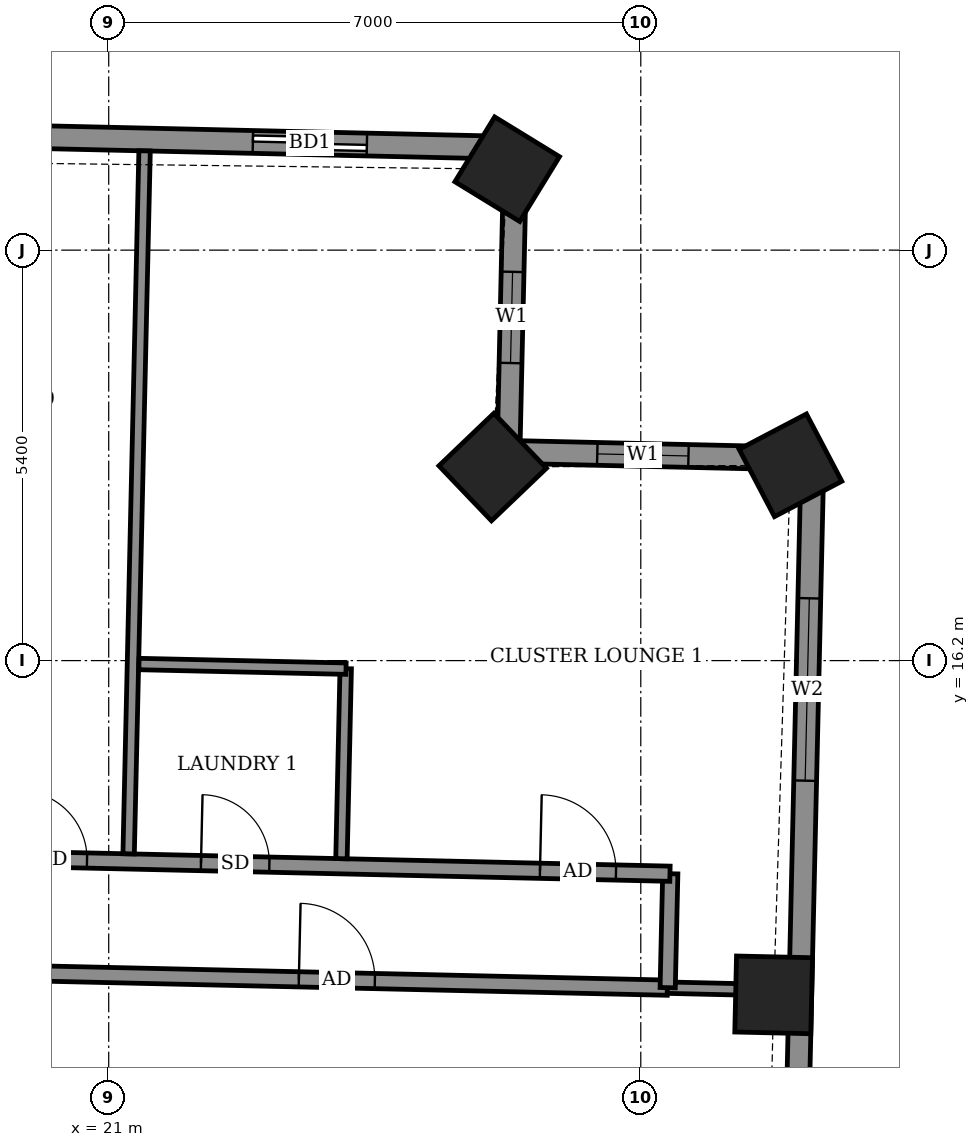
"""IFC4 building model, lengths in metres.
Left out: names, types, materials, properties, quantities, classifications, styles, units other than length and angle.
Written with IfcOpenShell. Run it as: python <this file> out.ifc"""

import sys

from ifc_helpers import new_model, si_unit, direction, frame, frame_2d, origin, origin_2d, place, context, subcontext, project, spatial, rectangle, extrude, element, fill, save


model = new_model("IFC4")
c1 = context("Model", 3, precision=1e-05, world=origin(), true_north=direction((0.0, 1.0)))
c2 = subcontext(c1, "Body", "Model", "MODEL_VIEW")
j1 = project(units=[si_unit("LENGTHUNIT", "METRE"), si_unit("PLANEANGLEUNIT", "RADIAN")], contexts=[c1])
p1 = place(None, origin())
s1 = spatial("IfcSite", under=j1, at=p1, CompositionType="ELEMENT")
p2 = place(p1, origin())
s2 = spatial("IfcBuilding", under=s1, at=p2, CompositionType="ELEMENT")
p3 = place(p2, frame((0.0, 0.0, 268.1)))
s3 = spatial("IfcBuildingStorey", under=s2, at=p3, CompositionType="ELEMENT", Elevation=268.1)
for number, where, z_axis, x_axis in (
    (1, (29.748, 11.802, -0.55), (0.0, 0.0, 1.0), (0.023, 1.0, 0.0)),
    (2, (29.969, 18.77, -0.55), (0.0, 0.0, 1.0), (-0.465, 0.885, 0.0)),
    (3, (26.052, 18.747, -0.55), (0.0, 0.0, 1.0), (-0.691, 0.723, 0.0)),
    (4, (26.243, 22.665, -0.55), (0.0, 0.0, 1.0), (-0.852, 0.523, 0.0)),
):
    element("IfcColumn", number, at=place(p3, frame(where, z_axis=z_axis, x_axis=x_axis)), inside=s3, PredefinedType="COLUMN", context=c2, shape_type="SweptSolid", body=[
        extrude(rectangle(XDim=1.0, YDim=1.0, at=origin_2d()), origin(), (0.0, 0.0, 1.0), 3.6),
    ])
p4 = place(p3, frame((29.923, 4.085, 0.0), z_axis=(0.0, 0.0, 1.0), x_axis=(0.022738672774, 0.999741442954, 0.0)))
e5 = element("IfcWall", 5, at=p4, inside=s3, PredefinedType="SOLIDWALL", context=c2, shape_type="SweptSolid", body=[
    extrude(rectangle(XDim=14.774, YDim=0.3, at=frame_2d((7.387, 0.0))), origin(), (0.0, 0.0, 1.0), 2.55),
])
p5 = place(p4, frame((4.853, 0.0, 0.0)))
e6 = element("IfcOpeningElement", 6, at=p5, cuts=e5, PredefinedType="OPENING", context=c2, shape_type="SweptSolid", body=[
    extrude(rectangle(XDim=1.5, YDim=2.4, at=frame_2d((0.75, 1.2))), frame((0.0, 0.16, 0.0), z_axis=(0.0, -1.0, 0.0), x_axis=(1.0, 0.0, 0.0)), (0.0, 0.0, 1.0), 0.32),
])
p6 = place(p4, frame((10.538, 0.0, 0.9)))
e7 = element("IfcOpeningElement", 7, at=p6, cuts=e5, PredefinedType="OPENING", context=c2, shape_type="SweptSolid", body=[
    extrude(rectangle(XDim=2.4, YDim=1.5, at=frame_2d((1.2, 0.75))), frame((0.0, 0.16, 0.0), z_axis=(0.0, -1.0, 0.0), x_axis=(1.0, 0.0, 0.0)), (0.0, 0.0, 1.0), 0.32),
])
p7 = place(p3, frame((30.259, 18.855, 0.0), z_axis=(0.0, 0.0, 1.0), x_axis=(-0.999740826251, 0.022765770952, 0.0)))
e8 = element("IfcWall", 8, at=p7, inside=s3, PredefinedType="SOLIDWALL", context=c2, shape_type="SweptSolid", body=[
    extrude(rectangle(XDim=4.0, YDim=0.3, at=frame_2d((2.0, 0.0))), origin(), (0.0, 0.0, 1.0), 2.55),
])
p8 = place(p7, frame((1.632, 0.0, 0.9)))
e9 = element("IfcOpeningElement", 9, at=p8, cuts=e8, PredefinedType="OPENING", context=c2, shape_type="SweptSolid", body=[
    extrude(rectangle(XDim=1.2, YDim=1.5, at=frame_2d((0.6, 0.75))), frame((0.0, 0.16, 0.0), z_axis=(0.0, -1.0, 0.0), x_axis=(1.0, 0.0, 0.0)), (0.0, 0.0, 1.0), 0.32),
])
p9 = place(p3, frame((26.26, 18.946, 0.0), z_axis=(0.0, 0.0, 1.0), x_axis=(0.022521758502, 0.999746353029, 0.0)))
e10 = element("IfcWall", 10, at=p9, inside=s3, PredefinedType="SOLIDWALL", context=c2, shape_type="SweptSolid", body=[
    extrude(rectangle(XDim=4.0, YDim=0.3, at=frame_2d((2.0, 0.0))), origin(), (0.0, 0.0, 1.0), 2.55),
])
p10 = place(p9, frame((1.169, 0.0, 0.9)))
e11 = element("IfcOpeningElement", 11, at=p10, cuts=e10, PredefinedType="OPENING", context=c2, shape_type="SweptSolid", body=[
    extrude(rectangle(XDim=1.2, YDim=1.5, at=frame_2d((0.6, 0.75))), frame((0.0, 0.16, 0.0), z_axis=(0.0, -1.0, 0.0), x_axis=(1.0, 0.0, 0.0)), (0.0, 0.0, 1.0), 0.32),
])
p11 = place(p3, frame((26.35, 22.945, 0.0), z_axis=(0.0, 0.0, 1.0), x_axis=(-0.999742523712, 0.022691105788, 0.0)))
e12 = element("IfcWall", 12, at=p11, inside=s3, PredefinedType="SOLIDWALL", context=c2, shape_type="SweptSolid", body=[
    extrude(rectangle(XDim=47.771, YDim=0.3, at=frame_2d((23.886, 0.0))), origin(), (0.0, 0.0, 1.0), 2.55),
])
p12 = place(p11, frame((1.954, 0.0, 0.0)))
e13 = element("IfcOpeningElement", 13, at=p12, cuts=e12, PredefinedType="OPENING", context=c2, shape_type="SweptSolid", body=[
    extrude(rectangle(XDim=1.5, YDim=2.4, at=frame_2d((0.75, 1.2))), frame((0.0, 0.16, 0.0), z_axis=(0.0, -1.0, 0.0), x_axis=(1.0, 0.0, 0.0)), (0.0, 0.0, 1.0), 0.32),
])
p13 = place(p11, frame((7.37, 0.0, 0.0)))
e14 = element("IfcOpeningElement", 14, at=p13, cuts=e12, PredefinedType="OPENING", context=c2, shape_type="SweptSolid", body=[
    extrude(rectangle(XDim=1.5, YDim=2.4, at=frame_2d((0.75, 1.2))), frame((0.0, 0.16, 0.0), z_axis=(0.0, -1.0, 0.0), x_axis=(1.0, 0.0, 0.0)), (0.0, 0.0, 1.0), 0.32),
])
p14 = place(p11, frame((10.554, 0.0, 0.0)))
e15 = element("IfcOpeningElement", 15, at=p14, cuts=e12, PredefinedType="OPENING", context=c2, shape_type="SweptSolid", body=[
    extrude(rectangle(XDim=1.5, YDim=2.4, at=frame_2d((0.75, 1.2))), frame((0.0, 0.16, 0.0), z_axis=(0.0, -1.0, 0.0), x_axis=(1.0, 0.0, 0.0)), (0.0, 0.0, 1.0), 0.32),
])
p15 = place(p11, frame((15.104, 0.0, 0.0)))
e16 = element("IfcOpeningElement", 16, at=p15, cuts=e12, PredefinedType="OPENING", context=c2, shape_type="SweptSolid", body=[
    extrude(rectangle(XDim=1.5, YDim=2.4, at=frame_2d((0.75, 1.2))), frame((0.0, 0.16, 0.0), z_axis=(0.0, -1.0, 0.0), x_axis=(1.0, 0.0, 0.0)), (0.0, 0.0, 1.0), 0.32),
])
p16 = place(p11, frame((18.287, 0.0, 0.0)))
e17 = element("IfcOpeningElement", 17, at=p16, cuts=e12, PredefinedType="OPENING", context=c2, shape_type="SweptSolid", body=[
    extrude(rectangle(XDim=1.5, YDim=2.4, at=frame_2d((0.75, 1.2))), frame((0.0, 0.16, 0.0), z_axis=(0.0, -1.0, 0.0), x_axis=(1.0, 0.0, 0.0)), (0.0, 0.0, 1.0), 0.32),
])
p17 = place(p11, frame((23.622, 0.0, 0.0)))
e18 = element("IfcOpeningElement", 18, at=p17, cuts=e12, PredefinedType="OPENING", context=c2, shape_type="SweptSolid", body=[
    extrude(rectangle(XDim=1.5, YDim=2.4, at=frame_2d((0.75, 1.2))), frame((0.0, 0.16, 0.0), z_axis=(0.0, -1.0, 0.0), x_axis=(1.0, 0.0, 0.0)), (0.0, 0.0, 1.0), 0.32),
])
p18 = place(p11, frame((28.521, 0.0, 0.0)))
e19 = element("IfcOpeningElement", 19, at=p18, cuts=e12, PredefinedType="OPENING", context=c2, shape_type="SweptSolid", body=[
    extrude(rectangle(XDim=1.5, YDim=2.4, at=frame_2d((0.75, 1.2))), frame((0.0, 0.16, 0.0), z_axis=(0.0, -1.0, 0.0), x_axis=(1.0, 0.0, 0.0)), (0.0, 0.0, 1.0), 0.32),
])
p19 = place(p11, frame((31.705, 0.0, 0.0)))
e20 = element("IfcOpeningElement", 20, at=p19, cuts=e12, PredefinedType="OPENING", context=c2, shape_type="SweptSolid", body=[
    extrude(rectangle(XDim=1.5, YDim=2.4, at=frame_2d((0.75, 1.2))), frame((0.0, 0.16, 0.0), z_axis=(0.0, -1.0, 0.0), x_axis=(1.0, 0.0, 0.0)), (0.0, 0.0, 1.0), 0.32),
])
p20 = place(p11, frame((36.722, 0.0, 0.0)))
e21 = element("IfcOpeningElement", 21, at=p20, cuts=e12, PredefinedType="OPENING", context=c2, shape_type="SweptSolid", body=[
    extrude(rectangle(XDim=1.5, YDim=2.4, at=frame_2d((0.75, 1.2))), frame((0.0, 0.16, 0.0), z_axis=(0.0, -1.0, 0.0), x_axis=(1.0, 0.0, 0.0)), (0.0, 0.0, 1.0), 0.32),
])
p21 = place(p11, frame((41.963, 0.0, 0.0)))
e22 = element("IfcOpeningElement", 22, at=p21, cuts=e12, PredefinedType="OPENING", context=c2, shape_type="SweptSolid", body=[
    extrude(rectangle(XDim=1.5, YDim=2.4, at=frame_2d((0.75, 1.2))), frame((0.0, 0.16, 0.0), z_axis=(0.0, -1.0, 0.0), x_axis=(1.0, 0.0, 0.0)), (0.0, 0.0, 1.0), 0.32),
])
p22 = place(p11, frame((44.436, 0.0, 0.9)))
e23 = element("IfcOpeningElement", 23, at=p22, cuts=e12, PredefinedType="OPENING", context=c2, shape_type="SweptSolid", body=[
    extrude(rectangle(XDim=2.4, YDim=1.5, at=frame_2d((1.2, 0.75))), frame((0.0, 0.16, 0.0), z_axis=(0.0, -1.0, 0.0), x_axis=(1.0, 0.0, 0.0)), (0.0, 0.0, 1.0), 0.32),
])
p23 = place(p3, frame((17.753, 12.137, 0.0), z_axis=(0.0, 0.0, 1.0), x_axis=(0.999743663474, -0.022640833553, 0.0)))
e24 = element("IfcWall", 24, at=p23, inside=s3, PredefinedType="PARTITIONING", context=c2, shape_type="SweptSolid", body=[
    extrude(rectangle(XDim=10.6, YDim=0.2, at=frame_2d((5.3, 0.0))), origin(), (0.0, 0.0, 1.0), 3.05),
])
p24 = place(p23, frame((5.75, 0.0, 0.0)))
e25 = element("IfcOpeningElement", 25, at=p24, cuts=e24, PredefinedType="OPENING", context=c2, shape_type="SweptSolid", body=[
    extrude(rectangle(XDim=1.0, YDim=2.1, at=frame_2d((0.5, 1.05))), frame((0.0, 0.11, 0.0), z_axis=(0.0, -1.0, 0.0), x_axis=(1.0, 0.0, 0.0)), (0.0, 0.0, 1.0), 0.22),
])
p25 = place(p3, frame((28.35, 11.897, 0.0), z_axis=(0.0, 0.0, 1.0), x_axis=(0.999734618493, -0.023036765969, 0.0)))
e26 = element("IfcWall", 26, at=p25, inside=s3, PredefinedType="PARTITIONING", context=c2, shape_type="SweptSolid", body=[
    extrude(rectangle(XDim=1.6, YDim=0.15, at=frame_2d((0.8, 0.0))), origin(), (0.0, 0.0, 1.0), 3.05),
])
p26 = place(p3, frame((28.354, 11.897, 0.0), z_axis=(0.0, 0.0, 1.0), x_axis=(0.022632637625, 0.99974384905, 0.0)))
e27 = element("IfcWall", 27, at=p26, inside=s3, PredefinedType="PARTITIONING", context=c2, shape_type="SweptSolid", body=[
    extrude(rectangle(XDim=1.5, YDim=0.2, at=frame_2d((0.75, 0.0))), origin(), (0.0, 0.0, 1.0), 3.05),
])
p27 = place(p3, frame((-24.474, 14.596, 0.0), z_axis=(0.0, 0.0, 1.0), x_axis=(0.999742424031, -0.022695497208, 0.0)))
e28 = element("IfcWall", 28, at=p27, inside=s3, PredefinedType="PARTITIONING", context=c2, shape_type="SweptSolid", body=[
    extrude(rectangle(XDim=52.872, YDim=0.2, at=frame_2d((26.436, 0.0))), origin(), (0.0, 0.0, 1.0), 3.05),
])
p28 = place(p27, frame((51.161, 0.0, 0.0)))
e29 = element("IfcOpeningElement", 29, at=p28, cuts=e28, PredefinedType="OPENING", context=c2, shape_type="SweptSolid", body=[
    extrude(rectangle(XDim=1.0, YDim=2.1, at=frame_2d((0.5, 1.05))), frame((0.0, 0.11, 0.0), z_axis=(0.0, -1.0, 0.0), x_axis=(1.0, 0.0, 0.0)), (0.0, 0.0, 1.0), 0.22),
])
p29 = place(p27, frame((46.7, 0.0, 0.0)))
e30 = element("IfcOpeningElement", 30, at=p29, cuts=e28, PredefinedType="OPENING", context=c2, shape_type="SweptSolid", body=[
    extrude(rectangle(XDim=0.9, YDim=2.1, at=frame_2d((0.45, 1.05))), frame((0.0, 0.11, 0.0), z_axis=(0.0, -1.0, 0.0), x_axis=(1.0, 0.0, 0.0)), (0.0, 0.0, 1.0), 0.22),
])
p30 = place(p27, frame((44.3, 0.0, 0.0)))
e31 = element("IfcOpeningElement", 31, at=p30, cuts=e28, PredefinedType="OPENING", context=c2, shape_type="SweptSolid", body=[
    extrude(rectangle(XDim=0.9, YDim=2.1, at=frame_2d((0.45, 1.05))), frame((0.0, 0.11, 0.0), z_axis=(0.0, -1.0, 0.0), x_axis=(1.0, 0.0, 0.0)), (0.0, 0.0, 1.0), 0.22),
])
p31 = place(p27, frame((37.575, 0.0, 0.0)))
e32 = element("IfcOpeningElement", 32, at=p31, cuts=e28, PredefinedType="OPENING", context=c2, shape_type="SweptSolid", body=[
    extrude(rectangle(XDim=0.9, YDim=2.1, at=frame_2d((0.45, 1.05))), frame((0.0, 0.11, 0.0), z_axis=(0.0, -1.0, 0.0), x_axis=(1.0, 0.0, 0.0)), (0.0, 0.0, 1.0), 0.22),
])
p32 = place(p27, frame((35.675, 0.0, 0.0)))
e33 = element("IfcOpeningElement", 33, at=p32, cuts=e28, PredefinedType="OPENING", context=c2, shape_type="SweptSolid", body=[
    extrude(rectangle(XDim=0.9, YDim=2.1, at=frame_2d((0.45, 1.05))), frame((0.0, 0.11, 0.0), z_axis=(0.0, -1.0, 0.0), x_axis=(1.0, 0.0, 0.0)), (0.0, 0.0, 1.0), 0.22),
])
p33 = place(p27, frame((28.95, 0.0, 0.0)))
e34 = element("IfcOpeningElement", 34, at=p33, cuts=e28, PredefinedType="OPENING", context=c2, shape_type="SweptSolid", body=[
    extrude(rectangle(XDim=0.9, YDim=2.1, at=frame_2d((0.45, 1.05))), frame((0.0, 0.11, 0.0), z_axis=(0.0, -1.0, 0.0), x_axis=(1.0, 0.0, 0.0)), (0.0, 0.0, 1.0), 0.22),
])
p34 = place(p27, frame((27.0, 0.0, 0.0)))
e35 = element("IfcOpeningElement", 35, at=p34, cuts=e28, PredefinedType="OPENING", context=c2, shape_type="SweptSolid", body=[
    extrude(rectangle(XDim=0.9, YDim=2.1, at=frame_2d((0.45, 1.05))), frame((0.0, 0.11, 0.0), z_axis=(0.0, -1.0, 0.0), x_axis=(1.0, 0.0, 0.0)), (0.0, 0.0, 1.0), 0.22),
])
p35 = place(p27, frame((20.2, 0.0, 0.0)))
e36 = element("IfcOpeningElement", 36, at=p35, cuts=e28, PredefinedType="OPENING", context=c2, shape_type="SweptSolid", body=[
    extrude(rectangle(XDim=0.9, YDim=2.1, at=frame_2d((0.45, 1.05))), frame((0.0, 0.11, 0.0), z_axis=(0.0, -1.0, 0.0), x_axis=(1.0, 0.0, 0.0)), (0.0, 0.0, 1.0), 0.22),
])
p36 = place(p27, frame((18.25, 0.0, 0.0)))
e37 = element("IfcOpeningElement", 37, at=p36, cuts=e28, PredefinedType="OPENING", context=c2, shape_type="SweptSolid", body=[
    extrude(rectangle(XDim=0.9, YDim=2.1, at=frame_2d((0.45, 1.05))), frame((0.0, 0.11, 0.0), z_axis=(0.0, -1.0, 0.0), x_axis=(1.0, 0.0, 0.0)), (0.0, 0.0, 1.0), 0.22),
])
p37 = place(p27, frame((11.5, 0.0, 0.0)))
e38 = element("IfcOpeningElement", 38, at=p37, cuts=e28, PredefinedType="OPENING", context=c2, shape_type="SweptSolid", body=[
    extrude(rectangle(XDim=0.9, YDim=2.1, at=frame_2d((0.45, 1.05))), frame((0.0, 0.11, 0.0), z_axis=(0.0, -1.0, 0.0), x_axis=(1.0, 0.0, 0.0)), (0.0, 0.0, 1.0), 0.22),
])
p38 = place(p27, frame((9.475, 0.0, 0.0)))
e39 = element("IfcOpeningElement", 39, at=p38, cuts=e28, PredefinedType="OPENING", context=c2, shape_type="SweptSolid", body=[
    extrude(rectangle(XDim=0.9, YDim=2.1, at=frame_2d((0.45, 1.05))), frame((0.0, 0.11, 0.0), z_axis=(0.0, -1.0, 0.0), x_axis=(1.0, 0.0, 0.0)), (0.0, 0.0, 1.0), 0.22),
])
p39 = place(p27, frame((2.293, 0.0, 0.0)))
e40 = element("IfcOpeningElement", 40, at=p39, cuts=e28, PredefinedType="OPENING", context=c2, shape_type="SweptSolid", body=[
    extrude(rectangle(XDim=1.0, YDim=2.1, at=frame_2d((0.5, 1.05))), frame((0.0, 0.11, 0.0), z_axis=(0.0, -1.0, 0.0), x_axis=(1.0, 0.0, 0.0)), (0.0, 0.0, 1.0), 0.22),
])
p40 = place(p3, frame((21.262, 13.658, 0.0), z_axis=(0.0, 0.0, 1.0), x_axis=(0.022697424684, 0.999742380272, 0.0)))
e41 = element("IfcWall", 41, at=p40, inside=s3, PredefinedType="PARTITIONING", context=c2, shape_type="SweptSolid", body=[
    extrude(rectangle(XDim=9.25, YDim=0.15, at=frame_2d((4.625, 0.0))), origin(), (0.0, 0.0, 1.0), 2.55),
])
p41 = place(p3, frame((24.062, 13.594, 0.0), z_axis=(0.0, 0.0, 1.0), x_axis=(0.022357691225, 0.99975003558, 0.0)))
e42 = element("IfcWall", 42, at=p41, inside=s3, PredefinedType="PARTITIONING", context=c2, shape_type="SweptSolid", body=[
    extrude(rectangle(XDim=2.501, YDim=0.15, at=frame_2d((1.25, 0.0))), origin(), (0.0, 0.0, 1.0), 3.05),
])
p42 = place(p3, frame((21.398, 16.155, 0.0), z_axis=(0.0, 0.0, 1.0), x_axis=(0.999749092391, -0.022399827308, 0.0)))
e43 = element("IfcWall", 43, at=p42, inside=s3, PredefinedType="PARTITIONING", context=c2, shape_type="SweptSolid", body=[
    extrude(rectangle(XDim=2.725, YDim=0.15, at=frame_2d((1.362, 0.0))), origin(), (0.0, 0.0, 1.0), 3.05),
])
p43 = place(p6, origin())
e44 = element("IfcWindow", 44, at=p43, inside=s3, PartitioningType="DOUBLE_PANEL_VERTICAL", PredefinedType="WINDOW", context=c2, shape_type="SweptSolid", body=[
    extrude(rectangle(XDim=2.4, YDim=1.5, at=frame_2d((1.2, 0.75))), frame((0.0, 0.03, 0.0), z_axis=(0.0, -1.0, 0.0), x_axis=(1.0, 0.0, 0.0)), (0.0, 0.0, 1.0), 0.06),
])
fill(e7, e44)
p44 = place(p8, origin())
e45 = element("IfcWindow", 45, at=p44, inside=s3, PartitioningType="SINGLE_PANEL", PredefinedType="WINDOW", context=c2, shape_type="SweptSolid", body=[
    extrude(rectangle(XDim=1.2, YDim=1.5, at=frame_2d((0.6, 0.75))), frame((0.0, 0.03, 0.0), z_axis=(0.0, -1.0, 0.0), x_axis=(1.0, 0.0, 0.0)), (0.0, 0.0, 1.0), 0.06),
])
fill(e9, e45)
p45 = place(p10, origin())
e46 = element("IfcWindow", 46, at=p45, inside=s3, PartitioningType="SINGLE_PANEL", PredefinedType="WINDOW", context=c2, shape_type="SweptSolid", body=[
    extrude(rectangle(XDim=1.2, YDim=1.5, at=frame_2d((0.6, 0.75))), frame((0.0, 0.03, 0.0), z_axis=(0.0, -1.0, 0.0), x_axis=(1.0, 0.0, 0.0)), (0.0, 0.0, 1.0), 0.06),
])
fill(e11, e46)
p46 = place(p12, origin())
e47 = element("IfcDoor", 47, at=p46, inside=s3, OperationType="SLIDING_TO_LEFT", PredefinedType="DOOR", context=c2, shape_type="SweptSolid", body=[
    extrude(rectangle(XDim=1.5, YDim=2.4, at=frame_2d((0.75, 1.2))), frame((0.0, 0.025, 0.0), z_axis=(0.0, -1.0, 0.0), x_axis=(1.0, 0.0, 0.0)), (0.0, 0.0, 1.0), 0.05),
])
fill(e13, e47)
p47 = place(p24, origin())
e48 = element("IfcDoor", 48, at=p47, inside=s3, OperationType="SINGLE_SWING_RIGHT", PredefinedType="DOOR", context=c2, shape_type="SweptSolid", body=[
    extrude(rectangle(XDim=1.0, YDim=2.1, at=frame_2d((0.5, 1.05))), frame((0.0, 0.025, 0.0), z_axis=(0.0, -1.0, 0.0), x_axis=(1.0, 0.0, 0.0)), (0.0, 0.0, 1.0), 0.05),
])
fill(e25, e48)
p48 = place(p28, origin())
e49 = element("IfcDoor", 49, at=p48, inside=s3, OperationType="SINGLE_SWING_LEFT", PredefinedType="DOOR", context=c2, shape_type="SweptSolid", body=[
    extrude(rectangle(XDim=1.0, YDim=2.1, at=frame_2d((0.5, 1.05))), frame((0.0, 0.025, 0.0), z_axis=(0.0, -1.0, 0.0), x_axis=(1.0, 0.0, 0.0)), (0.0, 0.0, 1.0), 0.05),
])
fill(e29, e49)
p49 = place(p29, origin())
e50 = element("IfcDoor", 50, at=p49, inside=s3, OperationType="SINGLE_SWING_RIGHT", PredefinedType="DOOR", context=c2, shape_type="SweptSolid", body=[
    extrude(rectangle(XDim=0.9, YDim=2.1, at=frame_2d((0.45, 1.05))), frame((0.0, 0.025, 0.0), z_axis=(0.0, -1.0, 0.0), x_axis=(1.0, 0.0, 0.0)), (0.0, 0.0, 1.0), 0.05),
])
fill(e30, e50)
p50 = place(p30, origin())
e51 = element("IfcDoor", 51, at=p50, inside=s3, OperationType="SINGLE_SWING_LEFT", PredefinedType="DOOR", context=c2, shape_type="SweptSolid", body=[
    extrude(rectangle(XDim=0.9, YDim=2.1, at=frame_2d((0.45, 1.05))), frame((0.0, 0.025, 0.0), z_axis=(0.0, -1.0, 0.0), x_axis=(1.0, 0.0, 0.0)), (0.0, 0.0, 1.0), 0.05),
])
fill(e31, e51)
save(model, sys.argv[1])
